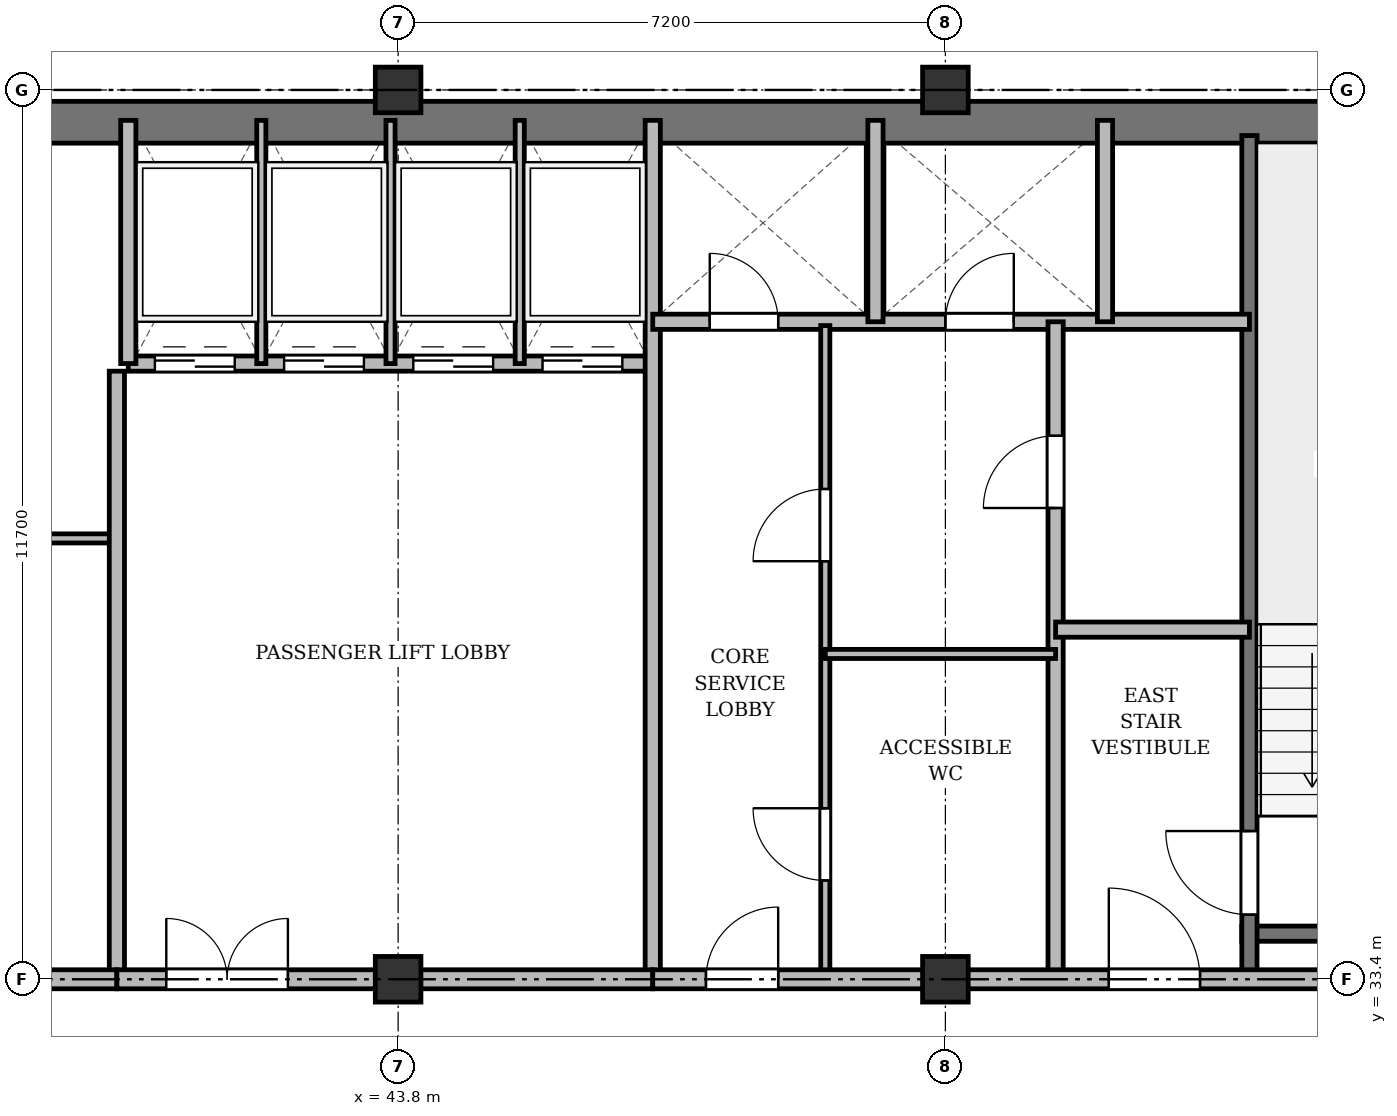
"""IFC4 building model, lengths in metres.
Left out: names, types, materials, properties, quantities, classifications, styles, units other than length and angle.
Written with IfcOpenShell. Run it as: python <this file> out.ifc"""

import sys

from ifc_helpers import new_model, si_unit, direction, frame, frame_2d, origin, origin_2d, place, context, subcontext, project, spatial, rectangle, extrude, source, transform, mapped, element, fill, save


model = new_model("IFC4")
c1 = context("Model", 3, precision=1e-05, world=origin(), true_north=direction((0.0, 1.0)))
c2 = subcontext(c1, "Body", "Model", "MODEL_VIEW")
j1 = project(units=[si_unit("LENGTHUNIT", "METRE"), si_unit("PLANEANGLEUNIT", "RADIAN")], contexts=[c1])
p1 = place(None, origin())
s1 = spatial("IfcSite", under=j1, at=p1, CompositionType="ELEMENT")
p2 = place(p1, origin())
s2 = spatial("IfcBuilding", under=s1, at=p2, CompositionType="ELEMENT")
p3 = place(p2, frame((0.0, 0.0, 266.7)))
s3 = spatial("IfcBuildingStorey", under=s2, at=p3, CompositionType="ELEMENT", Elevation=266.7)
m1 = source(origin(), c2, "Body", "SweptSolid", [
    extrude(rectangle(XDim=0.6, YDim=0.6, at=origin_2d()), origin(), (0.0, 0.0, 1.0), 3.6),
])
for number, where, z_axis, x_axis in (
    (1, (43.8, 33.4, 0.0), (0.0, 0.0, 1.0), (1.0, 0.0, 0.0)),
    (2, (43.8, 45.1, 0.0), (0.0, 0.0, 1.0), (1.0, 0.0, 0.0)),
    (3, (51.0, 33.4, 0.0), (0.0, 0.0, 1.0), (1.0, 0.0, 0.0)),
    (4, (51.0, 45.1, 0.0), (0.0, 0.0, 1.0), (1.0, 0.0, 0.0)),
):
    element("IfcColumn", number, at=place(p3, frame(where, z_axis=z_axis, x_axis=x_axis)), inside=s3, PredefinedType="COLUMN", context=c2, shape_type="MappedRepresentation", body=[
        mapped(m1, transform((0.0, 0.0, 0.0), x_axis=(1.0, 0.0, 0.0), y_axis=(0.0, 1.0, 0.0), z_axis=(0.0, 0.0, 1.0), scale=1.0)),
    ])
p4 = place(p3, frame((15.65, 44.675, 0.0), z_axis=(0.0, 0.0, 1.0), x_axis=(1.0, 0.0, 0.0)))
e5 = element("IfcWall", 5, at=p4, inside=s3, PredefinedType="SHEAR", context=c2, shape_type="SweptSolid", body=[
    extrude(rectangle(XDim=43.1, YDim=0.55, at=frame_2d((21.55, 0.0))), origin(), (0.0, 0.0, 1.0), 3.37),
])
p5 = place(p3, frame((54.9, 34.0, 0.0), z_axis=(0.0, 0.0, 1.0), x_axis=(1.0, 0.0, 0.0)))
e6 = element("IfcWall", 6, at=p5, inside=s3, PredefinedType="SHEAR", context=c2, shape_type="SweptSolid", body=[
    extrude(rectangle(XDim=3.4, YDim=0.2, at=frame_2d((1.7, 0.0))), origin(), (0.0, 0.0, 1.0), 3.37),
])
p6 = place(p3, frame((55.0, 33.4, 0.0), z_axis=(0.0, 0.0, 1.0), x_axis=(0.0, 1.0, 0.0)))
e7 = element("IfcWall", 7, at=p6, inside=s3, PredefinedType="SHEAR", context=c2, shape_type="SweptSolid", body=[
    extrude(rectangle(XDim=11.1, YDim=0.2, at=frame_2d((5.55, 0.0))), origin(), (0.0, 0.0, 1.0), 3.37),
])
p7 = place(p6, frame((0.85, 0.0, 0.0)))
e8 = element("IfcOpeningElement", 8, at=p7, cuts=e7, PredefinedType="OPENING", context=c2, shape_type="SweptSolid", body=[
    extrude(rectangle(XDim=1.1, YDim=2.15, at=frame_2d((0.55, 1.075))), frame((0.0, 0.11, 0.0), z_axis=(0.0, -1.0, 0.0), x_axis=(1.0, 0.0, 0.0)), (0.0, 0.0, 1.0), 0.22),
])
p8 = place(p3, frame((33.3, 39.2, 0.0), z_axis=(0.0, 0.0, 1.0), x_axis=(1.0, 0.0, 0.0)))
e9 = element("IfcWall", 9, at=p8, inside=s3, PredefinedType="PARTITIONING", context=c2, shape_type="SweptSolid", body=[
    extrude(rectangle(XDim=6.8, YDim=0.12, at=frame_2d((3.4, 0.0))), origin(), (0.0, 0.0, 1.0), 3.37),
])
p9 = place(p8, frame((2.6, 0.0, 0.0)))
e10 = element("IfcOpeningElement", 10, at=p9, cuts=e9, PredefinedType="OPENING", context=c2, shape_type="SweptSolid", body=[
    extrude(rectangle(XDim=0.95, YDim=2.15, at=frame_2d((0.475, 1.075))), frame((0.0, 0.07, 0.0), z_axis=(0.0, -1.0, 0.0), x_axis=(1.0, 0.0, 0.0)), (0.0, 0.0, 1.0), 0.14),
])
p10 = place(p3, frame((40.1, 33.4, 0.0), z_axis=(0.0, 0.0, 1.0), x_axis=(0.0, 1.0, 0.0)))
e11 = element("IfcWall", 11, at=p10, inside=s3, PredefinedType="SOLIDWALL", context=c2, shape_type="SweptSolid", body=[
    extrude(rectangle(XDim=8.0, YDim=0.2, at=frame_2d((4.0, 0.0))), origin(), (0.0, 0.0, 1.0), 2.92),
])
p11 = place(p3, frame((40.25, 41.5, 0.0), z_axis=(0.0, 0.0, 1.0), x_axis=(1.0, 0.0, 0.0)))
e12 = element("IfcWall", 12, at=p11, inside=s3, PredefinedType="SOLIDWALL", context=c2, shape_type="SweptSolid", body=[
    extrude(rectangle(XDim=6.9, YDim=0.2, at=frame_2d((3.45, 0.0))), origin(), (0.0, 0.0, 1.0), 3.37),
])
p12 = place(p11, frame((0.35, 0.0, 0.0)))
e13 = element("IfcOpeningElement", 13, at=p12, cuts=e12, PredefinedType="OPENING", context=c2, shape_type="SweptSolid", body=[
    extrude(rectangle(XDim=1.05, YDim=2.15, at=frame_2d((0.525, 1.075))), frame((0.0, 0.11, 0.0), z_axis=(0.0, -1.0, 0.0), x_axis=(1.0, 0.0, 0.0)), (0.0, 0.0, 1.0), 0.22),
])
p13 = place(p11, frame((2.05, 0.0, 0.0)))
e14 = element("IfcOpeningElement", 14, at=p13, cuts=e12, PredefinedType="OPENING", context=c2, shape_type="SweptSolid", body=[
    extrude(rectangle(XDim=1.05, YDim=2.15, at=frame_2d((0.525, 1.075))), frame((0.0, 0.11, 0.0), z_axis=(0.0, -1.0, 0.0), x_axis=(1.0, 0.0, 0.0)), (0.0, 0.0, 1.0), 0.22),
])
p14 = place(p11, frame((3.75, 0.0, 0.0)))
e15 = element("IfcOpeningElement", 15, at=p14, cuts=e12, PredefinedType="OPENING", context=c2, shape_type="SweptSolid", body=[
    extrude(rectangle(XDim=1.05, YDim=2.15, at=frame_2d((0.525, 1.075))), frame((0.0, 0.11, 0.0), z_axis=(0.0, -1.0, 0.0), x_axis=(1.0, 0.0, 0.0)), (0.0, 0.0, 1.0), 0.22),
])
p15 = place(p11, frame((5.45, 0.0, 0.0)))
e16 = element("IfcOpeningElement", 16, at=p15, cuts=e12, PredefinedType="OPENING", context=c2, shape_type="SweptSolid", body=[
    extrude(rectangle(XDim=1.05, YDim=2.15, at=frame_2d((0.525, 1.075))), frame((0.0, 0.11, 0.0), z_axis=(0.0, -1.0, 0.0), x_axis=(1.0, 0.0, 0.0)), (0.0, 0.0, 1.0), 0.22),
])
p16 = place(p3, frame((40.25, 41.5, 0.0), z_axis=(0.0, 0.0, 1.0), x_axis=(0.0, 1.0, 0.0)))
e17 = element("IfcWall", 17, at=p16, inside=s3, PredefinedType="SOLIDWALL", context=c2, shape_type="SweptSolid", body=[
    extrude(rectangle(XDim=3.2, YDim=0.2, at=frame_2d((1.6, 0.0))), origin(), (0.0, 0.0, 1.0), 3.37),
])
for number, where, z_axis, x_axis in (
    (18, (42.0, 41.5, 0.0), (0.0, 0.0, 1.0), (0.0, 1.0, 0.0)),
    (19, (43.7, 41.5, 0.0), (0.0, 0.0, 1.0), (0.0, 1.0, 0.0)),
    (20, (45.4, 41.5, 0.0), (0.0, 0.0, 1.0), (0.0, 1.0, 0.0)),
):
    element("IfcWall", number, at=place(p3, frame(where, z_axis=z_axis, x_axis=x_axis)), inside=s3, PredefinedType="PARTITIONING", context=c2, shape_type="SweptSolid", body=[
        extrude(rectangle(XDim=3.2, YDim=0.12, at=frame_2d((1.6, 0.0))), origin(), (0.0, 0.0, 1.0), 3.37),
    ])
p17 = place(p3, frame((47.15, 33.4, 0.0), z_axis=(0.0, 0.0, 1.0), x_axis=(0.0, 1.0, 0.0)))
e21 = element("IfcWall", 21, at=p17, inside=s3, PredefinedType="SOLIDWALL", context=c2, shape_type="SweptSolid", body=[
    extrude(rectangle(XDim=11.3, YDim=0.2, at=frame_2d((5.65, 0.0))), origin(), (0.0, 0.0, 1.0), 2.92),
])
p18 = place(p3, frame((33.3, 33.4, 0.0), z_axis=(0.0, 0.0, 1.0), x_axis=(1.0, 0.0, 0.0)))
e22 = element("IfcWall", 22, at=p18, inside=s3, PredefinedType="PARTITIONING", context=c2, shape_type="SweptSolid", body=[
    extrude(rectangle(XDim=6.8, YDim=0.25, at=frame_2d((3.4, 0.0))), origin(), (0.0, 0.0, 1.0), 2.92),
])
p19 = place(p18, frame((2.4, 0.0, 0.0)))
e23 = element("IfcOpeningElement", 23, at=p19, cuts=e22, PredefinedType="OPENING", context=c2, shape_type="SweptSolid", body=[
    extrude(rectangle(XDim=1.0, YDim=2.15, at=frame_2d((0.5, 1.075))), frame((0.0, 0.135, 0.0), z_axis=(0.0, -1.0, 0.0), x_axis=(1.0, 0.0, 0.0)), (0.0, 0.0, 1.0), 0.27),
])
p20 = place(p3, frame((40.1, 33.4, 0.0), z_axis=(0.0, 0.0, 1.0), x_axis=(1.0, 0.0, 0.0)))
e24 = element("IfcWall", 24, at=p20, inside=s3, PredefinedType="PARTITIONING", context=c2, shape_type="SweptSolid", body=[
    extrude(rectangle(XDim=7.05, YDim=0.25, at=frame_2d((3.525, 0.0))), origin(), (0.0, 0.0, 1.0), 2.92),
])
p21 = place(p20, frame((0.65, 0.0, 0.0)))
e25 = element("IfcOpeningElement", 25, at=p21, cuts=e24, PredefinedType="OPENING", context=c2, shape_type="SweptSolid", body=[
    extrude(rectangle(XDim=1.6, YDim=2.2, at=frame_2d((0.8, 1.1))), frame((0.0, 0.135, 0.0), z_axis=(0.0, -1.0, 0.0), x_axis=(1.0, 0.0, 0.0)), (0.0, 0.0, 1.0), 0.27),
])
p22 = place(p3, frame((47.15, 42.05, 0.0), z_axis=(0.0, 0.0, 1.0), x_axis=(1.0, 0.0, 0.0)))
e26 = element("IfcWall", 26, at=p22, inside=s3, PredefinedType="SOLIDWALL", context=c2, shape_type="SweptSolid", body=[
    extrude(rectangle(XDim=7.85, YDim=0.2, at=frame_2d((3.925, 0.0))), origin(), (0.0, 0.0, 1.0), 2.87),
])
p23 = place(p22, frame((0.75, 0.0, 0.0)))
e27 = element("IfcOpeningElement", 27, at=p23, cuts=e26, PredefinedType="OPENING", context=c2, shape_type="SweptSolid", body=[
    extrude(rectangle(XDim=0.9, YDim=2.1, at=frame_2d((0.45, 1.05))), frame((0.0, 0.11, 0.0), z_axis=(0.0, -1.0, 0.0), x_axis=(1.0, 0.0, 0.0)), (0.0, 0.0, 1.0), 0.22),
])
p24 = place(p22, frame((3.85, 0.0, 0.0)))
e28 = element("IfcOpeningElement", 28, at=p24, cuts=e26, PredefinedType="OPENING", context=c2, shape_type="SweptSolid", body=[
    extrude(rectangle(XDim=0.9, YDim=2.1, at=frame_2d((0.45, 1.05))), frame((0.0, 0.11, 0.0), z_axis=(0.0, -1.0, 0.0), x_axis=(1.0, 0.0, 0.0)), (0.0, 0.0, 1.0), 0.22),
])
for number, where, z_axis, x_axis in (
    (29, (50.08, 42.05, 0.0), (0.0, 0.0, 1.0), (0.0, 1.0, 0.0)),
    (30, (53.1, 42.05, 0.0), (0.0, 0.0, 1.0), (0.0, 1.0, 0.0)),
):
    element("IfcWall", number, at=place(p3, frame(where, z_axis=z_axis, x_axis=x_axis)), inside=s3, PredefinedType="SOLIDWALL", context=c2, shape_type="SweptSolid", body=[
        extrude(rectangle(XDim=2.65, YDim=0.2, at=frame_2d((1.325, 0.0))), origin(), (0.0, 0.0, 1.0), 3.37),
    ])
p25 = place(p3, frame((52.45, 33.4, 0.0), z_axis=(0.0, 0.0, 1.0), x_axis=(0.0, 1.0, 0.0)))
e31 = element("IfcWall", 31, at=p25, inside=s3, PredefinedType="PARTITIONING", context=c2, shape_type="SweptSolid", body=[
    extrude(rectangle(XDim=8.65, YDim=0.2, at=frame_2d((4.325, 0.0))), origin(), (0.0, 0.0, 1.0), 2.92),
])
p26 = place(p25, frame((6.2, 0.0, 0.0)))
e32 = element("IfcOpeningElement", 32, at=p26, cuts=e31, PredefinedType="OPENING", context=c2, shape_type="SweptSolid", body=[
    extrude(rectangle(XDim=0.95, YDim=2.15, at=frame_2d((0.475, 1.075))), frame((0.0, 0.11, 0.0), z_axis=(0.0, -1.0, 0.0), x_axis=(1.0, 0.0, 0.0)), (0.0, 0.0, 1.0), 0.22),
])
p27 = place(p3, frame((52.45, 38.0, 0.0), z_axis=(0.0, 0.0, 1.0), x_axis=(1.0, 0.0, 0.0)))
e33 = element("IfcWall", 33, at=p27, inside=s3, PredefinedType="PARTITIONING", context=c2, shape_type="SweptSolid", body=[
    extrude(rectangle(XDim=2.55, YDim=0.2, at=frame_2d((1.275, 0.0))), origin(), (0.0, 0.0, 1.0), 3.37),
])
p28 = place(p3, frame((49.42, 33.4, 0.0), z_axis=(0.0, 0.0, 1.0), x_axis=(0.0, 1.0, 0.0)))
e34 = element("IfcWall", 34, at=p28, inside=s3, PredefinedType="PARTITIONING", context=c2, shape_type="SweptSolid", body=[
    extrude(rectangle(XDim=8.6, YDim=0.12, at=frame_2d((4.3, 0.0))), origin(), (0.0, 0.0, 1.0), 2.92),
])
p29 = place(p28, frame((1.3, 0.0, 0.0)))
e35 = element("IfcOpeningElement", 35, at=p29, cuts=e34, PredefinedType="OPENING", context=c2, shape_type="SweptSolid", body=[
    extrude(rectangle(XDim=0.95, YDim=2.15, at=frame_2d((0.475, 1.075))), frame((0.0, 0.07, 0.0), z_axis=(0.0, -1.0, 0.0), x_axis=(1.0, 0.0, 0.0)), (0.0, 0.0, 1.0), 0.14),
])
p30 = place(p28, frame((5.5, 0.0, 0.0)))
e36 = element("IfcOpeningElement", 36, at=p30, cuts=e34, PredefinedType="OPENING", context=c2, shape_type="SweptSolid", body=[
    extrude(rectangle(XDim=0.95, YDim=2.15, at=frame_2d((0.475, 1.075))), frame((0.0, 0.07, 0.0), z_axis=(0.0, -1.0, 0.0), x_axis=(1.0, 0.0, 0.0)), (0.0, 0.0, 1.0), 0.14),
])
p31 = place(p3, frame((49.42, 37.68, 0.0), z_axis=(0.0, 0.0, 1.0), x_axis=(1.0, 0.0, 0.0)))
e37 = element("IfcWall", 37, at=p31, inside=s3, PredefinedType="PARTITIONING", context=c2, shape_type="SweptSolid", body=[
    extrude(rectangle(XDim=3.03, YDim=0.12, at=frame_2d((1.515, 0.0))), origin(), (0.0, 0.0, 1.0), 2.87),
])
p32 = place(p3, frame((47.15, 33.4, 0.0), z_axis=(0.0, 0.0, 1.0), x_axis=(1.0, 0.0, 0.0)))
e38 = element("IfcWall", 38, at=p32, inside=s3, PredefinedType="PARTITIONING", context=c2, shape_type="SweptSolid", body=[
    extrude(rectangle(XDim=11.15, YDim=0.25, at=frame_2d((5.575, 0.0))), origin(), (0.0, 0.0, 1.0), 2.92),
])
p33 = place(p32, frame((0.7, 0.0, 0.0)))
e39 = element("IfcOpeningElement", 39, at=p33, cuts=e38, PredefinedType="OPENING", context=c2, shape_type="SweptSolid", body=[
    extrude(rectangle(XDim=0.95, YDim=2.15, at=frame_2d((0.475, 1.075))), frame((0.0, 0.135, 0.0), z_axis=(0.0, -1.0, 0.0), x_axis=(1.0, 0.0, 0.0)), (0.0, 0.0, 1.0), 0.27),
])
p34 = place(p32, frame((6.0, 0.0, 0.0)))
e40 = element("IfcOpeningElement", 40, at=p34, cuts=e38, PredefinedType="OPENING", context=c2, shape_type="SweptSolid", body=[
    extrude(rectangle(XDim=1.2, YDim=2.15, at=frame_2d((0.6, 1.075))), frame((0.0, 0.135, 0.0), z_axis=(0.0, -1.0, 0.0), x_axis=(1.0, 0.0, 0.0)), (0.0, 0.0, 1.0), 0.27),
])
m2 = source(origin(), c2, "Body", "SweptSolid", [
    extrude(rectangle(XDim=1.1, YDim=2.15, at=frame_2d((0.55, 1.075))), frame((0.0, 0.025, 0.0), z_axis=(0.0, -1.0, 0.0), x_axis=(1.0, 0.0, 0.0)), (0.0, 0.0, 1.0), 0.05),
])
p35 = place(p7, origin())
e41 = element("IfcDoor", 41, at=p35, inside=s3, OperationType="SINGLE_SWING_RIGHT", PredefinedType="DOOR", context=c2, shape_type="MappedRepresentation", body=[
    mapped(m2, transform((0.0, 0.0, 0.0), x_axis=(1.0, 0.0, 0.0), y_axis=(0.0, 1.0, 0.0), z_axis=(0.0, 0.0, 1.0), scale=1.0)),
])
fill(e8, e41)
m3 = source(origin(), c2, "Body", "SweptSolid", [
    extrude(rectangle(XDim=1.05, YDim=2.15, at=frame_2d((0.525, 1.075))), frame((0.0, 0.025, 0.0), z_axis=(0.0, -1.0, 0.0), x_axis=(1.0, 0.0, 0.0)), (0.0, 0.0, 1.0), 0.05),
])
p36 = place(p12, origin())
e42 = element("IfcDoor", 42, at=p36, inside=s3, OperationType="DOUBLE_DOOR_SLIDING", PredefinedType="DOOR", context=c2, shape_type="MappedRepresentation", body=[
    mapped(m3, transform((0.0, 0.0, 0.0), x_axis=(1.0, 0.0, 0.0), y_axis=(0.0, 1.0, 0.0), z_axis=(0.0, 0.0, 1.0), scale=1.0)),
])
fill(e13, e42)
p37 = place(p13, origin())
e43 = element("IfcDoor", 43, at=p37, inside=s3, OperationType="DOUBLE_DOOR_SLIDING", PredefinedType="DOOR", context=c2, shape_type="MappedRepresentation", body=[
    mapped(m3, transform((0.0, 0.0, 0.0), x_axis=(1.0, 0.0, 0.0), y_axis=(0.0, 1.0, 0.0), z_axis=(0.0, 0.0, 1.0), scale=1.0)),
])
fill(e14, e43)
p38 = place(p14, origin())
e44 = element("IfcDoor", 44, at=p38, inside=s3, OperationType="DOUBLE_DOOR_SLIDING", PredefinedType="DOOR", context=c2, shape_type="MappedRepresentation", body=[
    mapped(m3, transform((0.0, 0.0, 0.0), x_axis=(1.0, 0.0, 0.0), y_axis=(0.0, 1.0, 0.0), z_axis=(0.0, 0.0, 1.0), scale=1.0)),
])
fill(e15, e44)
p39 = place(p15, origin())
e45 = element("IfcDoor", 45, at=p39, inside=s3, OperationType="DOUBLE_DOOR_SLIDING", PredefinedType="DOOR", context=c2, shape_type="MappedRepresentation", body=[
    mapped(m3, transform((0.0, 0.0, 0.0), x_axis=(1.0, 0.0, 0.0), y_axis=(0.0, 1.0, 0.0), z_axis=(0.0, 0.0, 1.0), scale=1.0)),
])
fill(e16, e45)
m4 = source(origin(), c2, "Body", "SweptSolid", [
    extrude(rectangle(XDim=1.6, YDim=2.2, at=frame_2d((0.8, 1.1))), frame((0.0, 0.025, 0.0), z_axis=(0.0, -1.0, 0.0), x_axis=(1.0, 0.0, 0.0)), (0.0, 0.0, 1.0), 0.05),
])
p40 = place(p21, origin())
e46 = element("IfcDoor", 46, at=p40, inside=s3, OperationType="DOUBLE_DOOR_SINGLE_SWING", PredefinedType="DOOR", context=c2, shape_type="MappedRepresentation", body=[
    mapped(m4, transform((0.0, 0.0, 0.0), x_axis=(1.0, 0.0, 0.0), y_axis=(0.0, 1.0, 0.0), z_axis=(0.0, 0.0, 1.0), scale=1.0)),
])
fill(e25, e46)
m5 = source(origin(), c2, "Body", "SweptSolid", [
    extrude(rectangle(XDim=0.9, YDim=2.1, at=frame_2d((0.45, 1.05))), frame((0.0, 0.025, 0.0), z_axis=(0.0, -1.0, 0.0), x_axis=(1.0, 0.0, 0.0)), (0.0, 0.0, 1.0), 0.05),
])
p41 = place(p23, origin())
e47 = element("IfcDoor", 47, at=p41, inside=s3, OperationType="SINGLE_SWING_LEFT", PredefinedType="DOOR", context=c2, shape_type="MappedRepresentation", body=[
    mapped(m5, transform((0.0, 0.0, 0.0), x_axis=(1.0, 0.0, 0.0), y_axis=(0.0, 1.0, 0.0), z_axis=(0.0, 0.0, 1.0), scale=1.0)),
])
fill(e27, e47)
p42 = place(p24, origin())
e48 = element("IfcDoor", 48, at=p42, inside=s3, OperationType="SINGLE_SWING_RIGHT", PredefinedType="DOOR", context=c2, shape_type="MappedRepresentation", body=[
    mapped(m5, transform((0.0, 0.0, 0.0), x_axis=(1.0, 0.0, 0.0), y_axis=(0.0, 1.0, 0.0), z_axis=(0.0, 0.0, 1.0), scale=1.0)),
])
fill(e28, e48)
m6 = source(origin(), c2, "Body", "SweptSolid", [
    extrude(rectangle(XDim=0.95, YDim=2.15, at=frame_2d((0.475, 1.075))), frame((0.0, 0.025, 0.0), z_axis=(0.0, -1.0, 0.0), x_axis=(1.0, 0.0, 0.0)), (0.0, 0.0, 1.0), 0.05),
])
p43 = place(p26, origin())
e49 = element("IfcDoor", 49, at=p43, inside=s3, OperationType="SINGLE_SWING_LEFT", PredefinedType="DOOR", context=c2, shape_type="MappedRepresentation", body=[
    mapped(m6, transform((0.0, 0.0, 0.0), x_axis=(1.0, 0.0, 0.0), y_axis=(0.0, 1.0, 0.0), z_axis=(0.0, 0.0, 1.0), scale=1.0)),
])
fill(e32, e49)
p44 = place(p29, origin())
e50 = element("IfcDoor", 50, at=p44, inside=s3, OperationType="SINGLE_SWING_RIGHT", PredefinedType="DOOR", context=c2, shape_type="MappedRepresentation", body=[
    mapped(m6, transform((0.0, 0.0, 0.0), x_axis=(1.0, 0.0, 0.0), y_axis=(0.0, 1.0, 0.0), z_axis=(0.0, 0.0, 1.0), scale=1.0)),
])
fill(e35, e50)
p45 = place(p30, origin())
e51 = element("IfcDoor", 51, at=p45, inside=s3, OperationType="SINGLE_SWING_LEFT", PredefinedType="DOOR", context=c2, shape_type="MappedRepresentation", body=[
    mapped(m6, transform((0.0, 0.0, 0.0), x_axis=(1.0, 0.0, 0.0), y_axis=(0.0, 1.0, 0.0), z_axis=(0.0, 0.0, 1.0), scale=1.0)),
])
fill(e36, e51)
p46 = place(p33, origin())
e52 = element("IfcDoor", 52, at=p46, inside=s3, OperationType="SINGLE_SWING_RIGHT", PredefinedType="DOOR", context=c2, shape_type="MappedRepresentation", body=[
    mapped(m6, transform((0.0, 0.0, 0.0), x_axis=(1.0, 0.0, 0.0), y_axis=(0.0, 1.0, 0.0), z_axis=(0.0, 0.0, 1.0), scale=1.0)),
])
fill(e39, e52)
m7 = source(origin(), c2, "Body", "SweptSolid", [
    extrude(rectangle(XDim=1.2, YDim=2.15, at=frame_2d((0.6, 1.075))), frame((0.0, 0.025, 0.0), z_axis=(0.0, -1.0, 0.0), x_axis=(1.0, 0.0, 0.0)), (0.0, 0.0, 1.0), 0.05),
])
p47 = place(p34, origin())
e53 = element("IfcDoor", 53, at=p47, inside=s3, OperationType="SINGLE_SWING_LEFT", PredefinedType="DOOR", context=c2, shape_type="MappedRepresentation", body=[
    mapped(m7, transform((0.0, 0.0, 0.0), x_axis=(1.0, 0.0, 0.0), y_axis=(0.0, 1.0, 0.0), z_axis=(0.0, 0.0, 1.0), scale=1.0)),
])
fill(e40, e53)
save(model, sys.argv[1])
